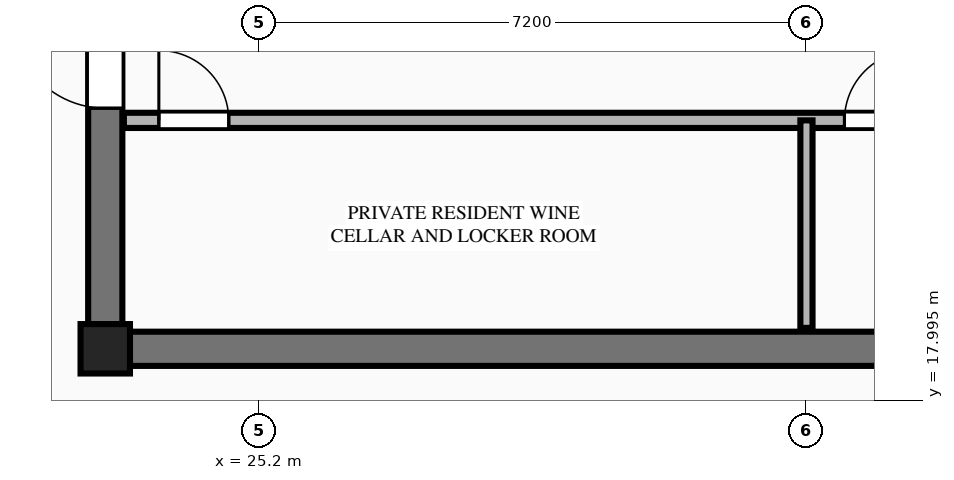
"""IFC4 building model, lengths in metres.
Left out: names, types, materials, properties, quantities, classifications, styles, units other than length and angle.
Written with IfcOpenShell. Run it as: python <this file> out.ifc"""

import sys

from ifc_helpers import new_model, si_unit, direction, frame, frame_2d, origin, origin_2d, place, context, subcontext, project, spatial, rectangle, extrude, element, fill, save


model = new_model("IFC4")
c1 = context("Model", 3, precision=1e-05, world=origin(), true_north=direction((0.0, 1.0)))
c2 = subcontext(c1, "Body", "Model", "MODEL_VIEW")
j1 = project(units=[si_unit("LENGTHUNIT", "METRE"), si_unit("PLANEANGLEUNIT", "RADIAN")], contexts=[c1])
p1 = place(None, origin())
s1 = spatial("IfcSite", under=j1, at=p1, CompositionType="ELEMENT")
p2 = place(p1, origin())
s2 = spatial("IfcBuilding", under=s1, at=p2, CompositionType="ELEMENT")
p3 = place(p2, frame((0.0, 0.0, 230.65)))
s3 = spatial("IfcBuildingStorey", under=s2, at=p3, CompositionType="ELEMENT", Elevation=230.65)
p4 = place(p3, frame((23.175, 18.675, 0.0), z_axis=(0.0, 0.0, 1.0), x_axis=(1.0, 0.0, 0.0)))
e1 = element("IfcColumn", 1, at=p4, inside=s3, PredefinedType="COLUMN", context=c2, shape_type="SweptSolid", body=[
    extrude(rectangle(XDim=0.65, YDim=0.65, at=origin_2d()), origin(), (0.0, 0.0, 1.0), 3.65),
])
p5 = place(p3, frame((23.5, 18.675, 0.0), z_axis=(0.0, 0.0, 1.0), x_axis=(1.0, 0.0, 0.0)))
e2 = element("IfcWall", 2, at=p5, inside=s3, PredefinedType="SHEAR", context=c2, shape_type="SweptSolid", body=[
    extrude(rectangle(XDim=17.8, YDim=0.45, at=frame_2d((8.9, 0.0))), origin(), (0.0, 0.0, 1.0), 3.45),
])
p6 = place(p3, frame((23.175, 19.0, 0.0), z_axis=(0.0, 0.0, 1.0), x_axis=(0.0, 1.0, 0.0)))
e3 = element("IfcWall", 3, at=p6, inside=s3, PredefinedType="SHEAR", context=c2, shape_type="SweptSolid", body=[
    extrude(rectangle(XDim=13.8, YDim=0.45, at=frame_2d((6.9, 0.0))), origin(), (0.0, 0.0, 1.0), 3.45),
])
p7 = place(p6, frame((2.84, 0.0, 0.0)))
e4 = element("IfcOpeningElement", 4, at=p7, cuts=e3, PredefinedType="OPENING", context=c2, shape_type="SweptSolid", body=[
    extrude(rectangle(XDim=1.22, YDim=2.25, at=frame_2d((0.61, 1.125))), frame((0.0, 0.235, 0.0), z_axis=(0.0, -1.0, 0.0), x_axis=(1.0, 0.0, 0.0)), (0.0, 0.0, 1.0), 0.47),
])
p8 = place(p3, frame((23.42, 21.68, 0.0), z_axis=(0.0, 0.0, 1.0), x_axis=(1.0, 0.0, 0.0)))
e5 = element("IfcWall", 5, at=p8, inside=s3, PredefinedType="PLUMBINGWALL", context=c2, shape_type="SweptSolid", body=[
    extrude(rectangle(XDim=17.96, YDim=0.2, at=frame_2d((8.98, 0.0))), origin(), (0.0, 0.0, 1.0), 3.45),
])
p9 = place(p8, frame((0.46, 0.0, 0.0)))
e6 = element("IfcOpeningElement", 6, at=p9, cuts=e5, PredefinedType="OPENING", context=c2, shape_type="SweptSolid", body=[
    extrude(rectangle(XDim=0.92, YDim=2.15, at=frame_2d((0.46, 1.075))), frame((0.0, 0.11, 0.0), z_axis=(0.0, -1.0, 0.0), x_axis=(1.0, 0.0, 0.0)), (0.0, 0.0, 1.0), 0.22),
])
p10 = place(p8, frame((9.48, 0.0, 0.0)))
e7 = element("IfcOpeningElement", 7, at=p10, cuts=e5, PredefinedType="OPENING", context=c2, shape_type="SweptSolid", body=[
    extrude(rectangle(XDim=0.92, YDim=2.15, at=frame_2d((0.46, 1.075))), frame((0.0, 0.11, 0.0), z_axis=(0.0, -1.0, 0.0), x_axis=(1.0, 0.0, 0.0)), (0.0, 0.0, 1.0), 0.22),
])
p11 = place(p3, frame((32.4, 18.95, 0.0), z_axis=(0.0, 0.0, 1.0), x_axis=(0.0, 1.0, 0.0)))
e8 = element("IfcWall", 8, at=p11, inside=s3, PredefinedType="PARTITIONING", context=c2, shape_type="SweptSolid", body=[
    extrude(rectangle(XDim=2.73, YDim=0.16, at=frame_2d((1.365, 0.0))), origin(), (0.0, 0.0, 1.0), 3.45),
])
p12 = place(p7, origin())
e9 = element("IfcDoor", 9, at=p12, inside=s3, OperationType="SINGLE_SWING_RIGHT", PredefinedType="DOOR", context=c2, shape_type="SweptSolid", body=[
    extrude(rectangle(XDim=1.22, YDim=2.25, at=frame_2d((0.61, 1.125))), frame((0.0, 0.025, 0.0), z_axis=(0.0, -1.0, 0.0), x_axis=(1.0, 0.0, 0.0)), (0.0, 0.0, 1.0), 0.05),
])
fill(e4, e9)
p13 = place(p9, origin())
e10 = element("IfcDoor", 10, at=p13, inside=s3, OperationType="SINGLE_SWING_LEFT", PredefinedType="DOOR", context=c2, shape_type="SweptSolid", body=[
    extrude(rectangle(XDim=0.92, YDim=2.15, at=frame_2d((0.46, 1.075))), frame((0.0, 0.025, 0.0), z_axis=(0.0, -1.0, 0.0), x_axis=(1.0, 0.0, 0.0)), (0.0, 0.0, 1.0), 0.05),
])
fill(e6, e10)
p14 = place(p10, origin())
e11 = element("IfcDoor", 11, at=p14, inside=s3, OperationType="SINGLE_SWING_RIGHT", PredefinedType="DOOR", context=c2, shape_type="SweptSolid", body=[
    extrude(rectangle(XDim=0.92, YDim=2.15, at=frame_2d((0.46, 1.075))), frame((0.0, 0.025, 0.0), z_axis=(0.0, -1.0, 0.0), x_axis=(1.0, 0.0, 0.0)), (0.0, 0.0, 1.0), 0.05),
])
fill(e7, e11)
save(model, sys.argv[1])
